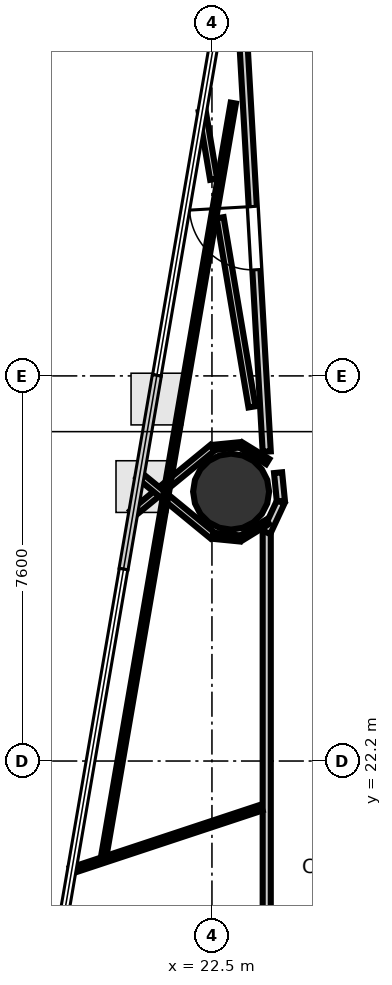
"""IFC4 building model, lengths in metres.
Left out: names, types, materials, properties, quantities, classifications, styles, units other than length and angle.
Written with IfcOpenShell. Run it as: python <this file> out.ifc"""

import sys

from ifc_helpers import new_model, si_unit, direction, frame, frame_2d, origin, origin_2d, place, context, subcontext, project, spatial, rectangle, hollow_circle, extrude, element, fill, save


model = new_model("IFC4")
c1 = context("Model", 3, precision=1e-05, world=origin(), true_north=direction((0.0, 1.0)))
c2 = subcontext(c1, "Body", "Model", "MODEL_VIEW")
j1 = project(units=[si_unit("LENGTHUNIT", "METRE"), si_unit("PLANEANGLEUNIT", "RADIAN")], contexts=[c1])
p1 = place(None, origin())
s1 = spatial("IfcSite", under=j1, at=p1, CompositionType="ELEMENT")
p2 = place(p1, origin())
s2 = spatial("IfcBuilding", under=s1, at=p2, CompositionType="ELEMENT")
p3 = place(p2, frame((0.0, 0.0, 105.2)))
s3 = spatial("IfcBuildingStorey", under=s2, at=p3, CompositionType="ELEMENT", Elevation=105.2)
p4 = place(p3, frame((22.878, 27.516, 0.0), z_axis=(0.0, 0.0, 1.0), x_axis=(1.0, 0.0, 0.0)))
e1 = element("IfcColumn", 1, at=p4, inside=s3, PredefinedType="COLUMN", context=c2, shape_type="SweptSolid", body=[
    extrude(hollow_circle(Radius=0.75, WallThickness=0.036, at=origin_2d()), origin(), (0.0, 0.0, 1.0), 3.7),
])
p5 = place(p3, frame((23.581, 28.307, 0.0), z_axis=(0.0, 0.0, 1.0), x_axis=(-0.056927299401, 0.998378326379, 0.0)))
e2 = element("IfcWall", 2, at=p5, inside=s3, PredefinedType="PARTITIONING", context=c2, shape_type="SweptSolid", body=[
    extrude(rectangle(XDim=10.615, YDim=0.16, at=frame_2d((5.307, 0.0))), origin(), (0.0, 0.0, 1.0), 2.84),
])
p6 = place(p5, frame((3.594, 0.0, 0.0)))
e3 = element("IfcOpeningElement", 3, at=p6, cuts=e2, PredefinedType="OPENING", context=c2, shape_type="SweptSolid", body=[
    extrude(rectangle(XDim=1.25, YDim=2.2, at=frame_2d((0.625, 1.1))), frame((0.0, 0.09, 0.0), z_axis=(0.0, -1.0, 0.0), x_axis=(1.0, 0.0, 0.0)), (0.0, 0.0, 1.0), 0.18),
])
p7 = place(p3, frame((23.581, 18.15, 0.0), z_axis=(0.0, 0.0, 1.0), x_axis=(0.0, 1.0, 0.0)))
e4 = element("IfcWall", 4, at=p7, inside=s3, PredefinedType="PARTITIONING", context=c2, shape_type="SweptSolid", body=[
    extrude(rectangle(XDim=8.575, YDim=0.16, at=frame_2d((4.288, 0.0))), origin(), (0.0, 0.0, 1.0), 2.84),
])
p8 = place(p3, frame((23.578, 26.712, 0.0), z_axis=(0.0, 0.0, 1.0), x_axis=(0.421251946418, 0.906943657367, 0.0)))
e5 = element("IfcWall", 5, at=p8, inside=s3, PredefinedType="PARTITIONING", context=c2, shape_type="SweptSolid", body=[
    extrude(rectangle(XDim=0.663, YDim=0.16, at=frame_2d((0.332, 0.0))), origin(), (0.0, 0.0, 1.0), 2.84),
])
p9 = place(p3, frame((23.86, 27.33, 0.0), z_axis=(0.0, 0.0, 1.0), x_axis=(-0.098000919071, 0.995186324193, 0.0)))
e6 = element("IfcWall", 6, at=p9, inside=s3, PredefinedType="PARTITIONING", context=c2, shape_type="SweptSolid", body=[
    extrude(rectangle(XDim=0.563, YDim=0.16, at=frame_2d((0.281, 0.0))), origin(), (0.0, 0.0, 1.0), 2.84),
])
p10 = place(p3, frame((19.713, 20.034, 0.0), z_axis=(0.0, 0.0, 1.0), x_axis=(0.949321292103, 0.314307308793, 0.0)))
e7 = element("IfcWall", 7, at=p10, inside=s3, PredefinedType="PARTITIONING", context=c2, shape_type="SweptSolid", body=[
    extrude(rectangle(XDim=3.968, YDim=0.12, at=frame_2d((1.984, 0.0))), origin(), (0.0, 0.0, 1.0), 2.84),
])
p11 = place(p3, frame((23.6, 28.11, 0.0), z_axis=(0.0, 0.0, 1.0), x_axis=(-0.851712341449, 0.524009625316, 0.0)))
e8 = element("IfcWall", 8, at=p11, inside=s3, PredefinedType="PARTITIONING", context=c2, shape_type="SweptSolid", body=[
    extrude(rectangle(XDim=0.621, YDim=0.12, at=frame_2d((0.31, 0.0))), origin(), (0.0, 0.0, 1.0), 2.84),
])
p12 = place(p3, frame((23.052, 28.439, 0.0), z_axis=(0.0, 0.0, 1.0), x_axis=(-0.995191506225, -0.09794828195, 0.0)))
e9 = element("IfcWall", 9, at=p12, inside=s3, PredefinedType="PARTITIONING", context=c2, shape_type="SweptSolid", body=[
    extrude(rectangle(XDim=0.528, YDim=0.105, at=frame_2d((0.264, 0.0))), origin(), (0.0, 0.0, 1.0), 2.84),
])
p13 = place(p3, frame((22.51, 28.381, 0.0), z_axis=(0.0, 0.0, 1.0), x_axis=(-0.772998253564, -0.63440814937, 0.0)))
e10 = element("IfcWall", 10, at=p13, inside=s3, PredefinedType="PARTITIONING", context=c2, shape_type="SweptSolid", body=[
    extrude(rectangle(XDim=2.043, YDim=0.14, at=frame_2d((1.022, 0.0))), origin(), (0.0, 0.0, 1.0), 2.84),
])
p14 = place(p3, frame((21.057, 27.844, 0.0), z_axis=(0.0, 0.0, 1.0), x_axis=(0.772990083311, -0.634418104331, 0.0)))
e11 = element("IfcWall", 11, at=p14, inside=s3, PredefinedType="PARTITIONING", context=c2, shape_type="SweptSolid", body=[
    extrude(rectangle(XDim=1.88, YDim=0.14, at=frame_2d((0.94, 0.0))), origin(), (0.0, 0.0, 1.0), 2.84),
])
p15 = place(p3, frame((22.527, 26.644, 0.0), z_axis=(0.0, 0.0, 1.0), x_axis=(0.995191506225, -0.09794828195, 0.0)))
e12 = element("IfcWall", 12, at=p15, inside=s3, PredefinedType="PARTITIONING", context=c2, shape_type="SweptSolid", body=[
    extrude(rectangle(XDim=0.528, YDim=0.12, at=frame_2d((0.264, 0.0))), origin(), (0.0, 0.0, 1.0), 2.84),
])
p16 = place(p3, frame((23.072, 26.597, 0.0), z_axis=(0.0, 0.0, 1.0), x_axis=(0.851536753009, 0.524294915363, 0.0)))
e13 = element("IfcWall", 13, at=p16, inside=s3, PredefinedType="PARTITIONING", context=c2, shape_type="SweptSolid", body=[
    extrude(rectangle(XDim=0.621, YDim=0.105, at=frame_2d((0.31, 0.0))), origin(), (0.0, 0.0, 1.0), 2.84),
])
p17 = place(p3, frame((20.371, 20.358, 0.0), z_axis=(0.0, 0.0, 1.0), x_axis=(0.169525939527, 0.985525725604, 0.0)))
e14 = element("IfcWall", 14, at=p17, inside=s3, PredefinedType="PARTITIONING", context=c2, shape_type="SweptSolid", body=[
    extrude(rectangle(XDim=15.044, YDim=0.105, at=frame_2d((7.522, 0.0))), origin(), (0.0, 0.0, 1.0), 2.84),
])
p18 = place(p3, frame((22.662, 32.921, 0.0), z_axis=(0.0, 0.0, 1.0), x_axis=(0.166124935367, -0.98610471343, 0.0)))
e15 = element("IfcWall", 15, at=p18, inside=s3, PredefinedType="PARTITIONING", context=c2, shape_type="SweptSolid", body=[
    extrude(rectangle(XDim=3.784, YDim=0.14, at=frame_2d((1.892, 0.0))), origin(), (0.0, 0.0, 1.0), 2.84),
])
p19 = place(p3, frame((22.308, 35.017, 0.0), z_axis=(0.0, 0.0, 1.0), x_axis=(0.166093075261, -0.98611008024, 0.0)))
e16 = element("IfcWall", 16, at=p19, inside=s3, PredefinedType="PARTITIONING", context=c2, shape_type="SweptSolid", body=[
    extrude(rectangle(XDim=1.355, YDim=0.14, at=frame_2d((0.678, 0.0))), origin(), (0.0, 0.0, 1.0), 2.84),
])
p20 = place(p6, origin())
e17 = element("IfcDoor", 17, at=p20, inside=s3, OperationType="SINGLE_SWING_RIGHT", PredefinedType="DOOR", context=c2, shape_type="SweptSolid", body=[
    extrude(rectangle(XDim=1.25, YDim=2.2, at=frame_2d((0.625, 1.1))), frame((0.0, 0.025, 0.0), z_axis=(0.0, -1.0, 0.0), x_axis=(1.0, 0.0, 0.0)), (0.0, 0.0, 1.0), 0.05),
])
fill(e3, e17)
save(model, sys.argv[1])
